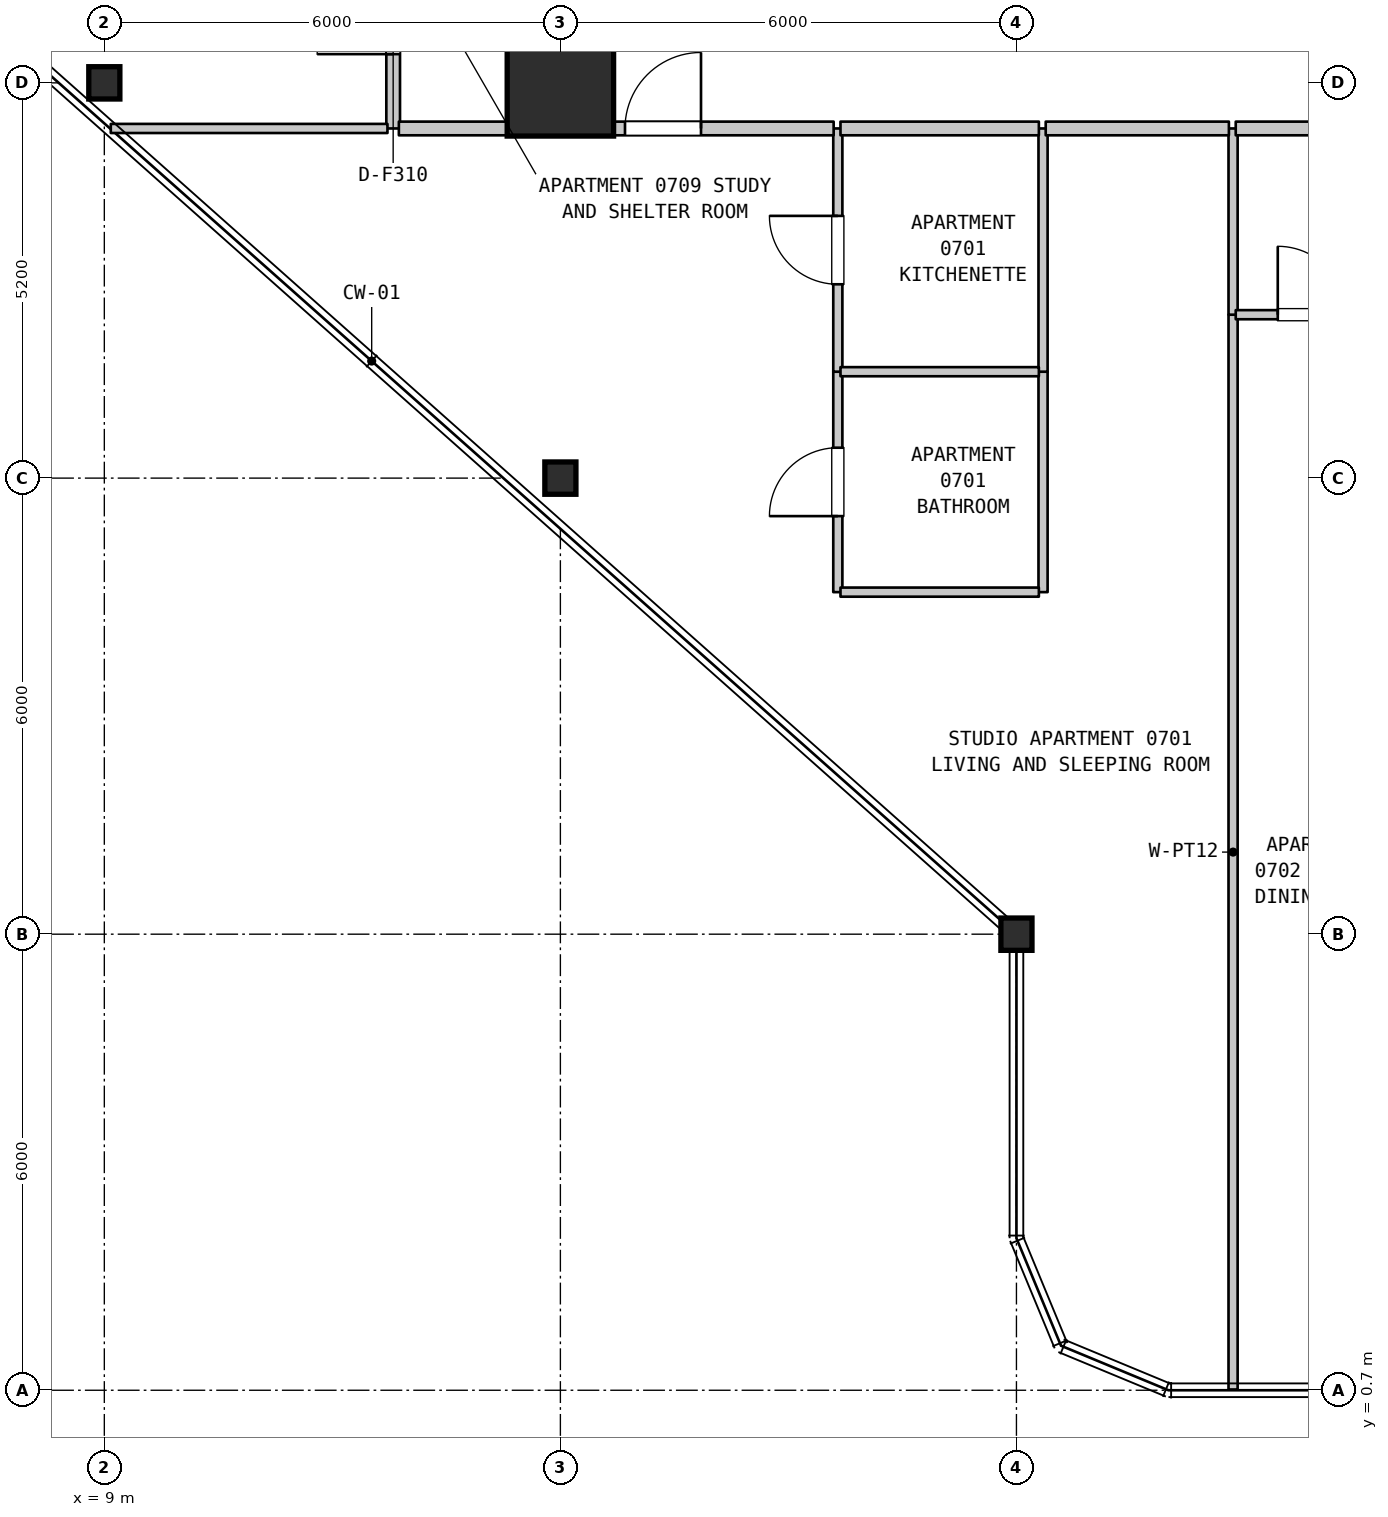
"""IFC4 building model, lengths in metres.
Left out: names, types, materials, properties, quantities, classifications, styles, units other than length and angle.
Written with IfcOpenShell. Run it as: python <this file> out.ifc"""

import sys

from ifc_helpers import new_model, si_unit, direction, frame, frame_2d, origin, origin_2d, place, context, subcontext, project, spatial, rectangle, i_section, extrude, element, fill, save


model = new_model("IFC4")
c1 = context("Model", 3, precision=1e-05, world=origin(), true_north=direction((0.0, 1.0)))
c2 = subcontext(c1, "Body", "Model", "MODEL_VIEW")
j1 = project(units=[si_unit("LENGTHUNIT", "METRE"), si_unit("PLANEANGLEUNIT", "RADIAN")], contexts=[c1])
p1 = place(None, origin())
s1 = spatial("IfcSite", under=j1, at=p1, CompositionType="ELEMENT")
p2 = place(p1, origin())
s2 = spatial("IfcBuilding", under=s1, at=p2, CompositionType="ELEMENT")
p3 = place(p2, frame((0.0, 0.0, 35.1)))
s3 = spatial("IfcBuildingStorey", under=s2, at=p3, CompositionType="ELEMENT", Elevation=35.1)
for number, where, z_axis, x_axis in (
    (1, (9.0, 17.9, 0.0), (0.0, 0.0, 1.0), (1.0, 0.0, 0.0)),
    (2, (15.0, 12.7, 0.0), (0.0, 0.0, 1.0), (1.0, 0.0, 0.0)),
):
    element("IfcColumn", number, at=place(p3, frame(where, z_axis=z_axis, x_axis=x_axis)), inside=s3, PredefinedType="COLUMN", context=c2, shape_type="SweptSolid", body=[
        extrude(i_section(OverallWidth=0.409, OverallDepth=0.425, WebThickness=0.032, FlangeThickness=0.052, FilletRadius=0.015, at=origin_2d()), origin(), (0.0, 0.0, 1.0), 3.7),
    ])
p4 = place(p3, frame((15.0, 17.9, 0.0), z_axis=(0.0, 0.0, 1.0), x_axis=(1.0, 0.0, 0.0)))
e3 = element("IfcColumn", 3, at=p4, inside=s3, PredefinedType="COLUMN", context=c2, shape_type="SweptSolid", body=[
    extrude(rectangle(XDim=1.4, YDim=1.4, at=origin_2d()), origin(), (0.0, 0.0, 1.0), 3.7),
])
p5 = place(p3, frame((21.0, 6.7, 0.0), z_axis=(0.0, 0.0, 1.0), x_axis=(1.0, 0.0, 0.0)))
e4 = element("IfcColumn", 4, at=p5, inside=s3, PredefinedType="COLUMN", context=c2, shape_type="SweptSolid", body=[
    extrude(i_section(OverallWidth=0.409, OverallDepth=0.425, WebThickness=0.032, FlangeThickness=0.052, FilletRadius=0.015, at=origin_2d()), origin(), (0.0, 0.0, 1.0), 3.7),
])
p6 = place(p3, frame((12.8, 17.3, 0.0), z_axis=(0.0, 0.0, 1.0), x_axis=(0.0, 1.0, 0.0)))
e5 = element("IfcWall", 5, at=p6, inside=s3, PredefinedType="STANDARD", context=c2, shape_type="SweptSolid", body=[
    extrude(rectangle(XDim=3.1, YDim=0.18, at=frame_2d((1.55, 0.0))), origin(), (0.0, 0.0, 1.0), 3.385),
])
p7 = place(p6, frame((0.978, 0.0, 0.0)))
e6 = element("IfcOpeningElement", 6, at=p7, cuts=e5, PredefinedType="OPENING", context=c2, shape_type="SweptSolid", body=[
    extrude(rectangle(XDim=1.0, YDim=2.15, at=frame_2d((0.5, 1.075))), frame((0.0, 0.1, 0.0), z_axis=(0.0, -1.0, 0.0), x_axis=(1.0, 0.0, 0.0)), (0.0, 0.0, 1.0), 0.2),
])
p8 = place(p3, frame((18.65, 11.2, 0.0), z_axis=(0.0, 0.0, 1.0), x_axis=(0.0, 1.0, 0.0)))
e7 = element("IfcWall", 7, at=p8, inside=s3, PredefinedType="PARTITIONING", context=c2, shape_type="SweptSolid", body=[
    extrude(rectangle(XDim=2.9, YDim=0.12, at=frame_2d((1.45, 0.0))), origin(), (0.0, 0.0, 1.0), 3.385),
])
p9 = place(p8, frame((1.0, 0.0, 0.0)))
e8 = element("IfcOpeningElement", 8, at=p9, cuts=e7, PredefinedType="OPENING", context=c2, shape_type="SweptSolid", body=[
    extrude(rectangle(XDim=0.9, YDim=2.1, at=frame_2d((0.45, 1.05))), frame((0.0, 0.07, 0.0), z_axis=(0.0, -1.0, 0.0), x_axis=(1.0, 0.0, 0.0)), (0.0, 0.0, 1.0), 0.14),
])
p10 = place(p3, frame((18.65, 14.1, 0.0), z_axis=(0.0, 0.0, 1.0), x_axis=(0.0, 1.0, 0.0)))
e9 = element("IfcWall", 9, at=p10, inside=s3, PredefinedType="PARTITIONING", context=c2, shape_type="SweptSolid", body=[
    extrude(rectangle(XDim=3.2, YDim=0.12, at=frame_2d((1.6, 0.0))), origin(), (0.0, 0.0, 1.0), 3.385),
])
p11 = place(p10, frame((1.15, 0.0, 0.0)))
e10 = element("IfcOpeningElement", 10, at=p11, cuts=e9, PredefinedType="OPENING", context=c2, shape_type="SweptSolid", body=[
    extrude(rectangle(XDim=0.9, YDim=2.15, at=frame_2d((0.45, 1.075))), frame((0.0, 0.07, 0.0), z_axis=(0.0, -1.0, 0.0), x_axis=(1.0, 0.0, 0.0)), (0.0, 0.0, 1.0), 0.14),
])
p12 = place(p3, frame((21.35, 11.2, 0.0), z_axis=(0.0, 0.0, 1.0), x_axis=(0.0, 1.0, 0.0)))
e11 = element("IfcWall", 11, at=p12, inside=s3, PredefinedType="PARTITIONING", context=c2, shape_type="SweptSolid", body=[
    extrude(rectangle(XDim=2.9, YDim=0.12, at=frame_2d((1.45, 0.0))), origin(), (0.0, 0.0, 1.0), 3.385),
])
p13 = place(p3, frame((21.35, 14.1, 0.0), z_axis=(0.0, 0.0, 1.0), x_axis=(0.0, 1.0, 0.0)))
e12 = element("IfcWall", 12, at=p13, inside=s3, PredefinedType="PARTITIONING", context=c2, shape_type="SweptSolid", body=[
    extrude(rectangle(XDim=3.2, YDim=0.12, at=frame_2d((1.6, 0.0))), origin(), (0.0, 0.0, 1.0), 3.385),
])
p14 = place(p3, frame((23.85, 0.71, 0.0), z_axis=(0.0, 0.0, 1.0), x_axis=(0.0, 1.0, 0.0)))
e13 = element("IfcWall", 13, at=p14, inside=s3, PredefinedType="PARTITIONING", context=c2, shape_type="SweptSolid", body=[
    extrude(rectangle(XDim=14.14, YDim=0.12, at=frame_2d((7.07, 0.0))), origin(), (0.0, 0.0, 1.0), 3.385),
])
p15 = place(p3, frame((23.85, 14.85, 0.0), z_axis=(0.0, 0.0, 1.0), x_axis=(0.0, 1.0, 0.0)))
e14 = element("IfcWall", 14, at=p15, inside=s3, PredefinedType="PARTITIONING", context=c2, shape_type="SweptSolid", body=[
    extrude(rectangle(XDim=2.45, YDim=0.12, at=frame_2d((1.225, 0.0))), origin(), (0.0, 0.0, 1.0), 3.385),
])
for number, where, z_axis, x_axis in (
    (15, (18.685, 11.2, 0.0), (0.0, 0.0, 1.0), (1.0, 0.0, 0.0)),
    (16, (18.685, 14.1, 0.0), (0.0, 0.0, 1.0), (1.0, 0.0, 0.0)),
):
    element("IfcWall", number, at=place(p3, frame(where, z_axis=z_axis, x_axis=x_axis)), inside=s3, PredefinedType="PARTITIONING", context=c2, shape_type="SweptSolid", body=[
        extrude(rectangle(XDim=2.61, YDim=0.12, at=frame_2d((1.305, 0.0))), origin(), (0.0, 0.0, 1.0), 3.385),
    ])
p16 = place(p3, frame((23.885, 14.85, 0.0), z_axis=(0.0, 0.0, 1.0), x_axis=(1.0, 0.0, 0.0)))
e17 = element("IfcWall", 17, at=p16, inside=s3, PredefinedType="PARTITIONING", context=c2, shape_type="SweptSolid", body=[
    extrude(rectangle(XDim=2.16, YDim=0.12, at=frame_2d((1.08, 0.0))), origin(), (0.0, 0.0, 1.0), 3.385),
])
p17 = place(p16, frame((0.553, 0.0, 0.0)))
e18 = element("IfcOpeningElement", 18, at=p17, cuts=e17, PredefinedType="OPENING", context=c2, shape_type="SweptSolid", body=[
    extrude(rectangle(XDim=0.9, YDim=2.15, at=frame_2d((0.45, 1.075))), frame((0.0, 0.07, 0.0), z_axis=(0.0, -1.0, 0.0), x_axis=(1.0, 0.0, 0.0)), (0.0, 0.0, 1.0), 0.14),
])
p18 = place(p3, frame((9.085, 17.3, 0.0), z_axis=(0.0, 0.0, 1.0), x_axis=(1.0, 0.0, 0.0)))
e19 = element("IfcWall", 19, at=p18, inside=s3, PredefinedType="PARTITIONING", context=c2, shape_type="SweptSolid", body=[
    extrude(rectangle(XDim=3.64, YDim=0.12, at=frame_2d((1.82, 0.0))), origin(), (0.0, 0.0, 1.0), 3.385),
])
p19 = place(p3, frame((12.875, 17.3, 0.0), z_axis=(0.0, 0.0, 1.0), x_axis=(1.0, 0.0, 0.0)))
e20 = element("IfcWall", 20, at=p19, inside=s3, PredefinedType="STANDARD", context=c2, shape_type="SweptSolid", body=[
    extrude(rectangle(XDim=5.72, YDim=0.18, at=frame_2d((2.86, 0.0))), origin(), (0.0, 0.0, 1.0), 3.385),
])
p20 = place(p19, frame((2.975, 0.0, 0.0)))
e21 = element("IfcOpeningElement", 21, at=p20, cuts=e20, PredefinedType="OPENING", context=c2, shape_type="SweptSolid", body=[
    extrude(rectangle(XDim=1.0, YDim=2.15, at=frame_2d((0.5, 1.075))), frame((0.0, 0.1, 0.0), z_axis=(0.0, -1.0, 0.0), x_axis=(1.0, 0.0, 0.0)), (0.0, 0.0, 1.0), 0.2),
])
p21 = place(p3, frame((18.685, 17.3, 0.0), z_axis=(0.0, 0.0, 1.0), x_axis=(1.0, 0.0, 0.0)))
e22 = element("IfcWall", 22, at=p21, inside=s3, PredefinedType="STANDARD", context=c2, shape_type="SweptSolid", body=[
    extrude(rectangle(XDim=2.61, YDim=0.18, at=frame_2d((1.305, 0.0))), origin(), (0.0, 0.0, 1.0), 3.385),
])
p22 = place(p3, frame((21.385, 17.3, 0.0), z_axis=(0.0, 0.0, 1.0), x_axis=(1.0, 0.0, 0.0)))
e23 = element("IfcWall", 23, at=p22, inside=s3, PredefinedType="STANDARD", context=c2, shape_type="SweptSolid", body=[
    extrude(rectangle(XDim=2.41, YDim=0.18, at=frame_2d((1.205, 0.0))), origin(), (0.0, 0.0, 1.0), 3.385),
])
p23 = place(p3, frame((23.885, 17.3, 0.0), z_axis=(0.0, 0.0, 1.0), x_axis=(1.0, 0.0, 0.0)))
e24 = element("IfcWall", 24, at=p23, inside=s3, PredefinedType="STANDARD", context=c2, shape_type="SweptSolid", body=[
    extrude(rectangle(XDim=5.095, YDim=0.18, at=frame_2d((2.547, 0.0))), origin(), (0.0, 0.0, 1.0), 3.385),
])
p24 = place(p23, frame((2.08, 0.0, 0.0)))
e25 = element("IfcOpeningElement", 25, at=p24, cuts=e24, PredefinedType="OPENING", context=c2, shape_type="SweptSolid", body=[
    extrude(rectangle(XDim=1.0, YDim=2.15, at=frame_2d((0.5, 1.075))), frame((0.0, 0.1, 0.0), z_axis=(0.0, -1.0, 0.0), x_axis=(1.0, 0.0, 0.0)), (0.0, 0.0, 1.0), 0.2),
])
p25 = place(p7, origin())
e26 = element("IfcDoor", 26, at=p25, inside=s3, OperationType="SINGLE_SWING_LEFT", PredefinedType="DOOR", context=c2, shape_type="SweptSolid", body=[
    extrude(rectangle(XDim=1.0, YDim=2.15, at=frame_2d((0.5, 1.075))), frame((0.0, 0.025, 0.0), z_axis=(0.0, -1.0, 0.0), x_axis=(1.0, 0.0, 0.0)), (0.0, 0.0, 1.0), 0.05),
])
fill(e6, e26)
p26 = place(p9, origin())
e27 = element("IfcDoor", 27, at=p26, inside=s3, OperationType="SINGLE_SWING_LEFT", PredefinedType="DOOR", context=c2, shape_type="SweptSolid", body=[
    extrude(rectangle(XDim=0.9, YDim=2.1, at=frame_2d((0.45, 1.05))), frame((0.0, 0.025, 0.0), z_axis=(0.0, -1.0, 0.0), x_axis=(1.0, 0.0, 0.0)), (0.0, 0.0, 1.0), 0.05),
])
fill(e8, e27)
p27 = place(p11, origin())
e28 = element("IfcDoor", 28, at=p27, inside=s3, OperationType="SINGLE_SWING_RIGHT", PredefinedType="DOOR", context=c2, shape_type="SweptSolid", body=[
    extrude(rectangle(XDim=0.9, YDim=2.15, at=frame_2d((0.45, 1.075))), frame((0.0, 0.025, 0.0), z_axis=(0.0, -1.0, 0.0), x_axis=(1.0, 0.0, 0.0)), (0.0, 0.0, 1.0), 0.05),
])
fill(e10, e28)
p28 = place(p17, origin())
e29 = element("IfcDoor", 29, at=p28, inside=s3, OperationType="SINGLE_SWING_LEFT", PredefinedType="DOOR", context=c2, shape_type="SweptSolid", body=[
    extrude(rectangle(XDim=0.9, YDim=2.15, at=frame_2d((0.45, 1.075))), frame((0.0, 0.025, 0.0), z_axis=(0.0, -1.0, 0.0), x_axis=(1.0, 0.0, 0.0)), (0.0, 0.0, 1.0), 0.05),
])
fill(e18, e29)
p29 = place(p20, origin())
e30 = element("IfcDoor", 30, at=p29, inside=s3, OperationType="SINGLE_SWING_RIGHT", PredefinedType="DOOR", context=c2, shape_type="SweptSolid", body=[
    extrude(rectangle(XDim=1.0, YDim=2.15, at=frame_2d((0.5, 1.075))), frame((0.0, 0.025, 0.0), z_axis=(0.0, -1.0, 0.0), x_axis=(1.0, 0.0, 0.0)), (0.0, 0.0, 1.0), 0.05),
])
fill(e21, e30)
save(model, sys.argv[1])
